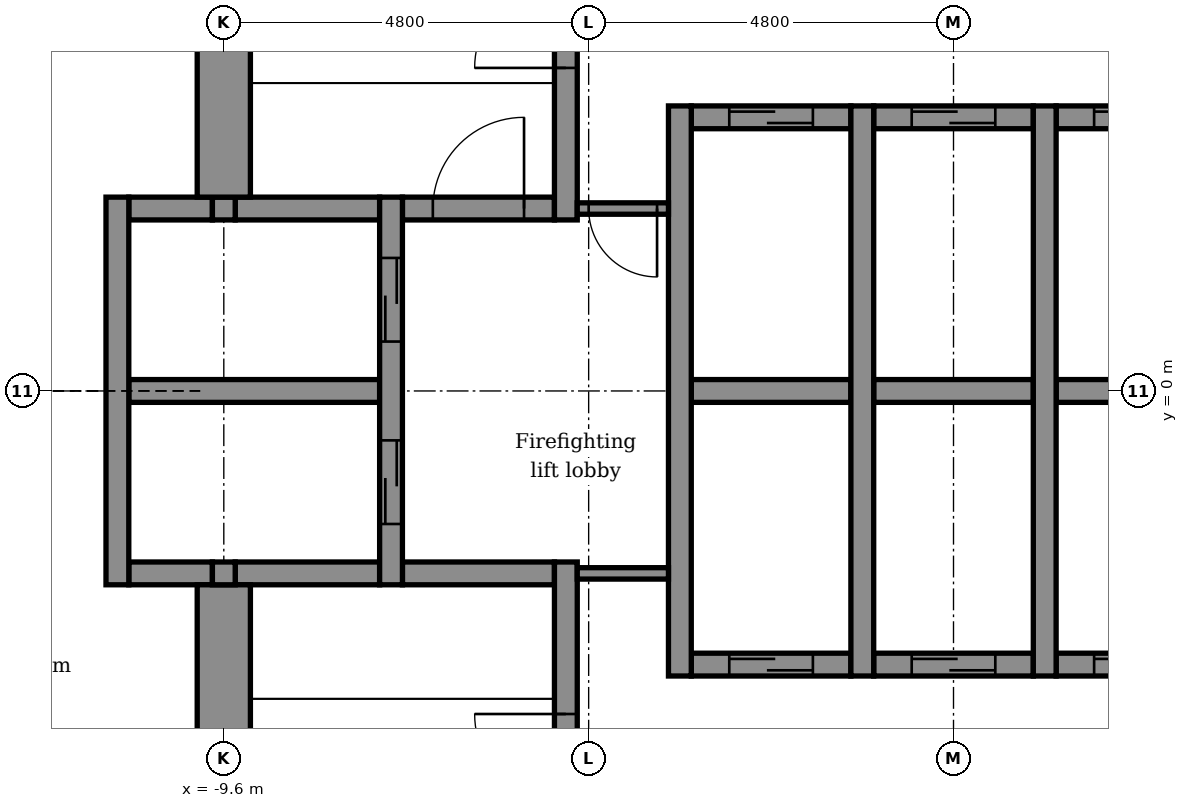
"""IFC4 building model, lengths in metres.
Left out: names, types, materials, properties, quantities, classifications, styles, units other than length and angle.
Written with IfcOpenShell. Run it as: python <this file> out.ifc"""

import sys

from ifc_helpers import new_model, si_unit, direction, frame, frame_2d, origin, place, context, subcontext, project, spatial, rectangle, extrude, element, fill, save


model = new_model("IFC4")
c1 = context("Model", 3, precision=1e-05, world=origin(), true_north=direction((0.0, 1.0)))
c2 = subcontext(c1, "Body", "Model", "MODEL_VIEW")
j1 = project(units=[si_unit("LENGTHUNIT", "METRE"), si_unit("PLANEANGLEUNIT", "RADIAN")], contexts=[c1])
p1 = place(None, origin())
s1 = spatial("IfcSite", under=j1, at=p1, CompositionType="ELEMENT")
p2 = place(p1, origin())
s2 = spatial("IfcBuilding", under=s1, at=p2, CompositionType="ELEMENT")
p3 = place(p2, frame((0.0, 0.0, 170.0)))
s3 = spatial("IfcBuildingStorey", under=s2, at=p3, CompositionType="ELEMENT", Elevation=170.0)
p4 = place(p3, frame((-3.45, -3.6, -0.15), z_axis=(0.0, 0.0, 1.0), x_axis=(1.0, 0.0, 0.0)))
e1 = element("IfcWall", 1, at=p4, inside=s3, PredefinedType="STANDARD", context=c2, shape_type="SweptSolid", body=[
    extrude(rectangle(XDim=2.1, YDim=0.3, at=frame_2d((1.05, 0.0))), origin(), (0.0, 0.0, 1.0), 3.9),
])
p5 = place(p4, frame((0.5, 0.0, 0.15)))
e2 = element("IfcOpeningElement", 2, at=p5, cuts=e1, PredefinedType="OPENING", context=c2, shape_type="SweptSolid", body=[
    extrude(rectangle(XDim=1.1, YDim=2.1, at=frame_2d((0.55, 1.05))), frame((0.0, 0.16, 0.0), z_axis=(0.0, -1.0, 0.0), x_axis=(1.0, 0.0, 0.0)), (0.0, 0.0, 1.0), 0.32),
])
p6 = place(p3, frame((-1.05, -3.6, -0.15), z_axis=(0.0, 0.0, 1.0), x_axis=(1.0, 0.0, 0.0)))
e3 = element("IfcWall", 3, at=p6, inside=s3, PredefinedType="STANDARD", context=c2, shape_type="SweptSolid", body=[
    extrude(rectangle(XDim=2.1, YDim=0.3, at=frame_2d((1.05, 0.0))), origin(), (0.0, 0.0, 1.0), 3.9),
])
p7 = place(p6, frame((0.5, 0.0, 0.15)))
e4 = element("IfcOpeningElement", 4, at=p7, cuts=e3, PredefinedType="OPENING", context=c2, shape_type="SweptSolid", body=[
    extrude(rectangle(XDim=1.1, YDim=2.1, at=frame_2d((0.55, 1.05))), frame((0.0, 0.16, 0.0), z_axis=(0.0, -1.0, 0.0), x_axis=(1.0, 0.0, 0.0)), (0.0, 0.0, 1.0), 0.32),
])
p8 = place(p3, frame((1.35, -3.6, -0.15), z_axis=(0.0, 0.0, 1.0), x_axis=(1.0, 0.0, 0.0)))
e5 = element("IfcWall", 5, at=p8, inside=s3, PredefinedType="STANDARD", context=c2, shape_type="SweptSolid", body=[
    extrude(rectangle(XDim=2.1, YDim=0.3, at=frame_2d((1.05, 0.0))), origin(), (0.0, 0.0, 1.0), 3.9),
])
p9 = place(p8, frame((0.5, 0.0, 0.15)))
e6 = element("IfcOpeningElement", 6, at=p9, cuts=e5, PredefinedType="OPENING", context=c2, shape_type="SweptSolid", body=[
    extrude(rectangle(XDim=1.1, YDim=2.1, at=frame_2d((0.55, 1.05))), frame((0.0, 0.16, 0.0), z_axis=(0.0, -1.0, 0.0), x_axis=(1.0, 0.0, 0.0)), (0.0, 0.0, 1.0), 0.32),
])
p10 = place(p3, frame((-10.85, -2.4, -0.15), z_axis=(0.0, 0.0, 1.0), x_axis=(1.0, 0.0, 0.0)))
e7 = element("IfcWall", 7, at=p10, inside=s3, PredefinedType="STANDARD", context=c2, shape_type="SweptSolid", body=[
    extrude(rectangle(XDim=1.1, YDim=0.3, at=frame_2d((0.55, 0.0))), origin(), (0.0, 0.0, 1.0), 3.9),
])
p11 = place(p3, frame((-9.45, -2.4, -0.15), z_axis=(0.0, 0.0, 1.0), x_axis=(1.0, 0.0, 0.0)))
e8 = element("IfcWall", 8, at=p11, inside=s3, PredefinedType="STANDARD", context=c2, shape_type="SweptSolid", body=[
    extrude(rectangle(XDim=1.9, YDim=0.3, at=frame_2d((0.95, 0.0))), origin(), (0.0, 0.0, 1.0), 3.9),
])
p12 = place(p3, frame((-7.25, -2.4, -0.15), z_axis=(0.0, 0.0, 1.0), x_axis=(1.0, 0.0, 0.0)))
e9 = element("IfcWall", 9, at=p12, inside=s3, PredefinedType="STANDARD", context=c2, shape_type="SweptSolid", body=[
    extrude(rectangle(XDim=2.0, YDim=0.3, at=frame_2d((1.0, 0.0))), origin(), (0.0, 0.0, 1.0), 3.9),
])
p13 = place(p3, frame((-10.85, 0.0, -0.15), z_axis=(0.0, 0.0, 1.0), x_axis=(1.0, 0.0, 0.0)))
e10 = element("IfcWall", 10, at=p13, inside=s3, PredefinedType="STANDARD", context=c2, shape_type="SweptSolid", body=[
    extrude(rectangle(XDim=3.3, YDim=0.3, at=frame_2d((1.65, 0.0))), origin(), (0.0, 0.0, 1.0), 3.9),
])
p14 = place(p3, frame((-3.45, 0.0, -0.15), z_axis=(0.0, 0.0, 1.0), x_axis=(1.0, 0.0, 0.0)))
e11 = element("IfcWall", 11, at=p14, inside=s3, PredefinedType="STANDARD", context=c2, shape_type="SweptSolid", body=[
    extrude(rectangle(XDim=2.1, YDim=0.3, at=frame_2d((1.05, 0.0))), origin(), (0.0, 0.0, 1.0), 3.9),
])
p15 = place(p3, frame((-1.05, 0.0, -0.15), z_axis=(0.0, 0.0, 1.0), x_axis=(1.0, 0.0, 0.0)))
e12 = element("IfcWall", 12, at=p15, inside=s3, PredefinedType="STANDARD", context=c2, shape_type="SweptSolid", body=[
    extrude(rectangle(XDim=2.1, YDim=0.3, at=frame_2d((1.05, 0.0))), origin(), (0.0, 0.0, 1.0), 3.9),
])
p16 = place(p3, frame((1.35, 0.0, -0.15), z_axis=(0.0, 0.0, 1.0), x_axis=(1.0, 0.0, 0.0)))
e13 = element("IfcWall", 13, at=p16, inside=s3, PredefinedType="STANDARD", context=c2, shape_type="SweptSolid", body=[
    extrude(rectangle(XDim=2.1, YDim=0.3, at=frame_2d((1.05, 0.0))), origin(), (0.0, 0.0, 1.0), 3.9),
])
p17 = place(p3, frame((-10.85, 2.4, -0.15), z_axis=(0.0, 0.0, 1.0), x_axis=(1.0, 0.0, 0.0)))
e14 = element("IfcWall", 14, at=p17, inside=s3, PredefinedType="STANDARD", context=c2, shape_type="SweptSolid", body=[
    extrude(rectangle(XDim=1.1, YDim=0.3, at=frame_2d((0.55, 0.0))), origin(), (0.0, 0.0, 1.0), 3.9),
])
p18 = place(p3, frame((-9.45, 2.4, -0.15), z_axis=(0.0, 0.0, 1.0), x_axis=(1.0, 0.0, 0.0)))
e15 = element("IfcWall", 15, at=p18, inside=s3, PredefinedType="STANDARD", context=c2, shape_type="SweptSolid", body=[
    extrude(rectangle(XDim=1.9, YDim=0.3, at=frame_2d((0.95, 0.0))), origin(), (0.0, 0.0, 1.0), 3.9),
])
p19 = place(p3, frame((-7.25, 2.4, -0.15), z_axis=(0.0, 0.0, 1.0), x_axis=(1.0, 0.0, 0.0)))
e16 = element("IfcWall", 16, at=p19, inside=s3, PredefinedType="STANDARD", context=c2, shape_type="SweptSolid", body=[
    extrude(rectangle(XDim=2.0, YDim=0.3, at=frame_2d((1.0, 0.0))), origin(), (0.0, 0.0, 1.0), 3.9),
])
p20 = place(p19, frame((0.4, 0.0, 0.15)))
e17 = element("IfcOpeningElement", 17, at=p20, cuts=e16, PredefinedType="OPENING", context=c2, shape_type="SweptSolid", body=[
    extrude(rectangle(XDim=1.2, YDim=2.1, at=frame_2d((0.6, 1.05))), frame((0.0, 0.16, 0.0), z_axis=(0.0, -1.0, 0.0), x_axis=(1.0, 0.0, 0.0)), (0.0, 0.0, 1.0), 0.32),
])
p21 = place(p3, frame((-3.45, 3.6, -0.15), z_axis=(0.0, 0.0, 1.0), x_axis=(1.0, 0.0, 0.0)))
e18 = element("IfcWall", 18, at=p21, inside=s3, PredefinedType="STANDARD", context=c2, shape_type="SweptSolid", body=[
    extrude(rectangle(XDim=2.1, YDim=0.3, at=frame_2d((1.05, 0.0))), origin(), (0.0, 0.0, 1.0), 3.9),
])
p22 = place(p21, frame((0.5, 0.0, 0.15)))
e19 = element("IfcOpeningElement", 19, at=p22, cuts=e18, PredefinedType="OPENING", context=c2, shape_type="SweptSolid", body=[
    extrude(rectangle(XDim=1.1, YDim=2.1, at=frame_2d((0.55, 1.05))), frame((0.0, 0.16, 0.0), z_axis=(0.0, -1.0, 0.0), x_axis=(1.0, 0.0, 0.0)), (0.0, 0.0, 1.0), 0.32),
])
p23 = place(p3, frame((-1.05, 3.6, -0.15), z_axis=(0.0, 0.0, 1.0), x_axis=(1.0, 0.0, 0.0)))
e20 = element("IfcWall", 20, at=p23, inside=s3, PredefinedType="STANDARD", context=c2, shape_type="SweptSolid", body=[
    extrude(rectangle(XDim=2.1, YDim=0.3, at=frame_2d((1.05, 0.0))), origin(), (0.0, 0.0, 1.0), 3.9),
])
p24 = place(p23, frame((0.5, 0.0, 0.15)))
e21 = element("IfcOpeningElement", 21, at=p24, cuts=e20, PredefinedType="OPENING", context=c2, shape_type="SweptSolid", body=[
    extrude(rectangle(XDim=1.1, YDim=2.1, at=frame_2d((0.55, 1.05))), frame((0.0, 0.16, 0.0), z_axis=(0.0, -1.0, 0.0), x_axis=(1.0, 0.0, 0.0)), (0.0, 0.0, 1.0), 0.32),
])
p25 = place(p3, frame((1.35, 3.6, -0.15), z_axis=(0.0, 0.0, 1.0), x_axis=(1.0, 0.0, 0.0)))
e22 = element("IfcWall", 22, at=p25, inside=s3, PredefinedType="STANDARD", context=c2, shape_type="SweptSolid", body=[
    extrude(rectangle(XDim=2.1, YDim=0.3, at=frame_2d((1.05, 0.0))), origin(), (0.0, 0.0, 1.0), 3.9),
])
p26 = place(p25, frame((0.5, 0.0, 0.15)))
e23 = element("IfcOpeningElement", 23, at=p26, cuts=e22, PredefinedType="OPENING", context=c2, shape_type="SweptSolid", body=[
    extrude(rectangle(XDim=1.1, YDim=2.1, at=frame_2d((0.55, 1.05))), frame((0.0, 0.16, 0.0), z_axis=(0.0, -1.0, 0.0), x_axis=(1.0, 0.0, 0.0)), (0.0, 0.0, 1.0), 0.32),
])
p27 = place(p3, frame((-11.0, -2.55, -0.15), z_axis=(0.0, 0.0, 1.0), x_axis=(0.0, 1.0, 0.0)))
e24 = element("IfcWall", 24, at=p27, inside=s3, PredefinedType="STANDARD", context=c2, shape_type="SweptSolid", body=[
    extrude(rectangle(XDim=5.1, YDim=0.3, at=frame_2d((2.55, 0.0))), origin(), (0.0, 0.0, 1.0), 3.9),
])
p28 = place(p3, frame((-9.6, -10.15, -0.15), z_axis=(0.0, 0.0, 1.0), x_axis=(0.0, 1.0, 0.0)))
e25 = element("IfcWall", 25, at=p28, inside=s3, PredefinedType="SHEAR", context=c2, shape_type="SweptSolid", body=[
    extrude(rectangle(XDim=7.6, YDim=0.7, at=frame_2d((3.8, 0.0))), origin(), (0.0, 0.0, 1.0), 3.9),
])
for number, where, z_axis, x_axis in (
    (26, (-9.6, -2.55, -0.15), (0.0, 0.0, 1.0), (0.0, 1.0, 0.0)),
    (27, (-9.6, 2.25, -0.15), (0.0, 0.0, 1.0), (0.0, 1.0, 0.0)),
):
    element("IfcWall", number, at=place(p3, frame(where, z_axis=z_axis, x_axis=x_axis)), inside=s3, PredefinedType="STANDARD", context=c2, shape_type="SweptSolid", body=[
        extrude(rectangle(XDim=0.3, YDim=0.3, at=frame_2d((0.15, 0.0))), origin(), (0.0, 0.0, 1.0), 3.9),
    ])
p29 = place(p3, frame((-9.6, 2.55, -0.15), z_axis=(0.0, 0.0, 1.0), x_axis=(0.0, 1.0, 0.0)))
e28 = element("IfcWall", 28, at=p29, inside=s3, PredefinedType="SHEAR", context=c2, shape_type="SweptSolid", body=[
    extrude(rectangle(XDim=7.6, YDim=0.7, at=frame_2d((3.8, 0.0))), origin(), (0.0, 0.0, 1.0), 3.9),
])
p30 = place(p3, frame((-7.4, -2.55, -0.15), z_axis=(0.0, 0.0, 1.0), x_axis=(0.0, 1.0, 0.0)))
e29 = element("IfcWall", 29, at=p30, inside=s3, PredefinedType="STANDARD", context=c2, shape_type="SweptSolid", body=[
    extrude(rectangle(XDim=5.1, YDim=0.3, at=frame_2d((2.55, 0.0))), origin(), (0.0, 0.0, 1.0), 3.9),
])
p31 = place(p30, frame((0.8, 0.0, 0.15)))
e30 = element("IfcOpeningElement", 30, at=p31, cuts=e29, PredefinedType="OPENING", context=c2, shape_type="SweptSolid", body=[
    extrude(rectangle(XDim=1.1, YDim=2.1, at=frame_2d((0.55, 1.05))), frame((0.0, 0.16, 0.0), z_axis=(0.0, -1.0, 0.0), x_axis=(1.0, 0.0, 0.0)), (0.0, 0.0, 1.0), 0.32),
])
p32 = place(p30, frame((3.2, 0.0, 0.15)))
e31 = element("IfcOpeningElement", 31, at=p32, cuts=e29, PredefinedType="OPENING", context=c2, shape_type="SweptSolid", body=[
    extrude(rectangle(XDim=1.1, YDim=2.1, at=frame_2d((0.55, 1.05))), frame((0.0, 0.16, 0.0), z_axis=(0.0, -1.0, 0.0), x_axis=(1.0, 0.0, 0.0)), (0.0, 0.0, 1.0), 0.32),
])
p33 = place(p3, frame((-5.1, -9.25, -0.15), z_axis=(0.0, 0.0, 1.0), x_axis=(0.0, 1.0, 0.0)))
e32 = element("IfcWall", 32, at=p33, inside=s3, PredefinedType="STANDARD", context=c2, shape_type="SweptSolid", body=[
    extrude(rectangle(XDim=7.0, YDim=0.3, at=frame_2d((3.5, 0.0))), origin(), (0.0, 0.0, 1.0), 3.9),
])
p34 = place(p33, frame((3.8, 0.0, 0.15)))
e33 = element("IfcOpeningElement", 33, at=p34, cuts=e32, PredefinedType="OPENING", context=c2, shape_type="SweptSolid", body=[
    extrude(rectangle(XDim=1.2, YDim=2.1, at=frame_2d((0.6, 1.05))), frame((0.0, 0.16, 0.0), z_axis=(0.0, -1.0, 0.0), x_axis=(1.0, 0.0, 0.0)), (0.0, 0.0, 1.0), 0.32),
])
p35 = place(p3, frame((-5.1, 2.25, -0.15), z_axis=(0.0, 0.0, 1.0), x_axis=(0.0, 1.0, 0.0)))
e34 = element("IfcWall", 34, at=p35, inside=s3, PredefinedType="STANDARD", context=c2, shape_type="SweptSolid", body=[
    extrude(rectangle(XDim=7.0, YDim=0.3, at=frame_2d((3.5, 0.0))), origin(), (0.0, 0.0, 1.0), 3.9),
])
p36 = place(p35, frame((2.0, 0.0, 0.15)))
e35 = element("IfcOpeningElement", 35, at=p36, cuts=e34, PredefinedType="OPENING", context=c2, shape_type="SweptSolid", body=[
    extrude(rectangle(XDim=1.2, YDim=2.1, at=frame_2d((0.6, 1.05))), frame((0.0, 0.16, 0.0), z_axis=(0.0, -1.0, 0.0), x_axis=(1.0, 0.0, 0.0)), (0.0, 0.0, 1.0), 0.32),
])
for number, where, z_axis, x_axis in (
    (36, (-3.6, -3.75, -0.15), (0.0, 0.0, 1.0), (0.0, 1.0, 0.0)),
    (37, (-1.2, -3.75, -0.15), (0.0, 0.0, 1.0), (0.0, 1.0, 0.0)),
    (38, (1.2, -3.75, -0.15), (0.0, 0.0, 1.0), (0.0, 1.0, 0.0)),
):
    element("IfcWall", number, at=place(p3, frame(where, z_axis=z_axis, x_axis=x_axis)), inside=s3, PredefinedType="STANDARD", context=c2, shape_type="SweptSolid", body=[
        extrude(rectangle(XDim=7.5, YDim=0.3, at=frame_2d((3.75, 0.0))), origin(), (0.0, 0.0, 1.0), 3.9),
    ])
p37 = place(p3, frame((-4.95, 2.4, 0.0), z_axis=(0.0, 0.0, 1.0), x_axis=(1.0, 0.0, 0.0)))
e39 = element("IfcWall", 39, at=p37, inside=s3, PredefinedType="PARTITIONING", context=c2, shape_type="SweptSolid", body=[
    extrude(rectangle(XDim=1.2, YDim=0.15, at=frame_2d((0.6, 0.0))), origin(), (0.0, 0.0, 1.0), 3.75),
])
p38 = place(p37, frame((0.15, 0.0, 0.0)))
e40 = element("IfcOpeningElement", 40, at=p38, cuts=e39, PredefinedType="OPENING", context=c2, shape_type="SweptSolid", body=[
    extrude(rectangle(XDim=0.9, YDim=2.1, at=frame_2d((0.45, 1.05))), frame((0.0, 0.085, 0.0), z_axis=(0.0, -1.0, 0.0), x_axis=(1.0, 0.0, 0.0)), (0.0, 0.0, 1.0), 0.17),
])
p39 = place(p3, frame((-4.95, -2.4, 0.0), z_axis=(0.0, 0.0, 1.0), x_axis=(1.0, 0.0, 0.0)))
e41 = element("IfcWall", 41, at=p39, inside=s3, PredefinedType="PARTITIONING", context=c2, shape_type="SweptSolid", body=[
    extrude(rectangle(XDim=1.2, YDim=0.15, at=frame_2d((0.6, 0.0))), origin(), (0.0, 0.0, 1.0), 3.75),
])
p40 = place(p31, origin())
e42 = element("IfcDoor", 42, at=p40, inside=s3, OperationType="DOUBLE_DOOR_SLIDING", PredefinedType="DOOR", context=c2, shape_type="SweptSolid", body=[
    extrude(rectangle(XDim=1.1, YDim=2.1, at=frame_2d((0.55, 1.05))), frame((0.0, 0.025, 0.0), z_axis=(0.0, -1.0, 0.0), x_axis=(1.0, 0.0, 0.0)), (0.0, 0.0, 1.0), 0.05),
])
fill(e30, e42)
p41 = place(p32, origin())
e43 = element("IfcDoor", 43, at=p41, inside=s3, OperationType="DOUBLE_DOOR_SLIDING", PredefinedType="DOOR", context=c2, shape_type="SweptSolid", body=[
    extrude(rectangle(XDim=1.1, YDim=2.1, at=frame_2d((0.55, 1.05))), frame((0.0, 0.025, 0.0), z_axis=(0.0, -1.0, 0.0), x_axis=(1.0, 0.0, 0.0)), (0.0, 0.0, 1.0), 0.05),
])
fill(e31, e43)
p42 = place(p22, origin())
e44 = element("IfcDoor", 44, at=p42, inside=s3, OperationType="DOUBLE_DOOR_SLIDING", PredefinedType="DOOR", context=c2, shape_type="SweptSolid", body=[
    extrude(rectangle(XDim=1.1, YDim=2.1, at=frame_2d((0.55, 1.05))), frame((0.0, 0.025, 0.0), z_axis=(0.0, -1.0, 0.0), x_axis=(1.0, 0.0, 0.0)), (0.0, 0.0, 1.0), 0.05),
])
fill(e19, e44)
p43 = place(p24, origin())
e45 = element("IfcDoor", 45, at=p43, inside=s3, OperationType="DOUBLE_DOOR_SLIDING", PredefinedType="DOOR", context=c2, shape_type="SweptSolid", body=[
    extrude(rectangle(XDim=1.1, YDim=2.1, at=frame_2d((0.55, 1.05))), frame((0.0, 0.025, 0.0), z_axis=(0.0, -1.0, 0.0), x_axis=(1.0, 0.0, 0.0)), (0.0, 0.0, 1.0), 0.05),
])
fill(e21, e45)
p44 = place(p26, origin())
e46 = element("IfcDoor", 46, at=p44, inside=s3, OperationType="DOUBLE_DOOR_SLIDING", PredefinedType="DOOR", context=c2, shape_type="SweptSolid", body=[
    extrude(rectangle(XDim=1.1, YDim=2.1, at=frame_2d((0.55, 1.05))), frame((0.0, 0.025, 0.0), z_axis=(0.0, -1.0, 0.0), x_axis=(1.0, 0.0, 0.0)), (0.0, 0.0, 1.0), 0.05),
])
fill(e23, e46)
p45 = place(p5, origin())
e47 = element("IfcDoor", 47, at=p45, inside=s3, OperationType="DOUBLE_DOOR_SLIDING", PredefinedType="DOOR", context=c2, shape_type="SweptSolid", body=[
    extrude(rectangle(XDim=1.1, YDim=2.1, at=frame_2d((0.55, 1.05))), frame((0.0, 0.025, 0.0), z_axis=(0.0, -1.0, 0.0), x_axis=(1.0, 0.0, 0.0)), (0.0, 0.0, 1.0), 0.05),
])
fill(e2, e47)
p46 = place(p7, origin())
e48 = element("IfcDoor", 48, at=p46, inside=s3, OperationType="DOUBLE_DOOR_SLIDING", PredefinedType="DOOR", context=c2, shape_type="SweptSolid", body=[
    extrude(rectangle(XDim=1.1, YDim=2.1, at=frame_2d((0.55, 1.05))), frame((0.0, 0.025, 0.0), z_axis=(0.0, -1.0, 0.0), x_axis=(1.0, 0.0, 0.0)), (0.0, 0.0, 1.0), 0.05),
])
fill(e4, e48)
p47 = place(p9, origin())
e49 = element("IfcDoor", 49, at=p47, inside=s3, OperationType="DOUBLE_DOOR_SLIDING", PredefinedType="DOOR", context=c2, shape_type="SweptSolid", body=[
    extrude(rectangle(XDim=1.1, YDim=2.1, at=frame_2d((0.55, 1.05))), frame((0.0, 0.025, 0.0), z_axis=(0.0, -1.0, 0.0), x_axis=(1.0, 0.0, 0.0)), (0.0, 0.0, 1.0), 0.05),
])
fill(e6, e49)
p48 = place(p36, origin())
e50 = element("IfcDoor", 50, at=p48, inside=s3, OperationType="SINGLE_SWING_LEFT", PredefinedType="DOOR", context=c2, shape_type="SweptSolid", body=[
    extrude(rectangle(XDim=1.2, YDim=2.1, at=frame_2d((0.6, 1.05))), frame((0.0, 0.025, 0.0), z_axis=(0.0, -1.0, 0.0), x_axis=(1.0, 0.0, 0.0)), (0.0, 0.0, 1.0), 0.05),
])
fill(e35, e50)
p49 = place(p34, origin())
e51 = element("IfcDoor", 51, at=p49, inside=s3, OperationType="SINGLE_SWING_RIGHT", PredefinedType="DOOR", context=c2, shape_type="SweptSolid", body=[
    extrude(rectangle(XDim=1.2, YDim=2.1, at=frame_2d((0.6, 1.05))), frame((0.0, 0.025, 0.0), z_axis=(0.0, -1.0, 0.0), x_axis=(1.0, 0.0, 0.0)), (0.0, 0.0, 1.0), 0.05),
])
fill(e33, e51)
p50 = place(p38, frame((0.9, 0.0, 0.0), z_axis=(0.0, 0.0, 1.0), x_axis=(-1.0, 0.0, 0.0)))
e52 = element("IfcDoor", 52, at=p50, inside=s3, OperationType="SINGLE_SWING_RIGHT", PredefinedType="DOOR", context=c2, shape_type="SweptSolid", body=[
    extrude(rectangle(XDim=0.9, YDim=2.1, at=frame_2d((0.45, 1.05))), frame((0.0, 0.025, 0.0), z_axis=(0.0, -1.0, 0.0), x_axis=(1.0, 0.0, 0.0)), (0.0, 0.0, 1.0), 0.05),
])
fill(e40, e52)
p51 = place(p20, origin())
e53 = element("IfcDoor", 53, at=p51, inside=s3, OperationType="SINGLE_SWING_RIGHT", PredefinedType="DOOR", context=c2, shape_type="SweptSolid", body=[
    extrude(rectangle(XDim=1.2, YDim=2.1, at=frame_2d((0.6, 1.05))), frame((0.0, 0.025, 0.0), z_axis=(0.0, -1.0, 0.0), x_axis=(1.0, 0.0, 0.0)), (0.0, 0.0, 1.0), 0.05),
])
fill(e17, e53)
save(model, sys.argv[1])
